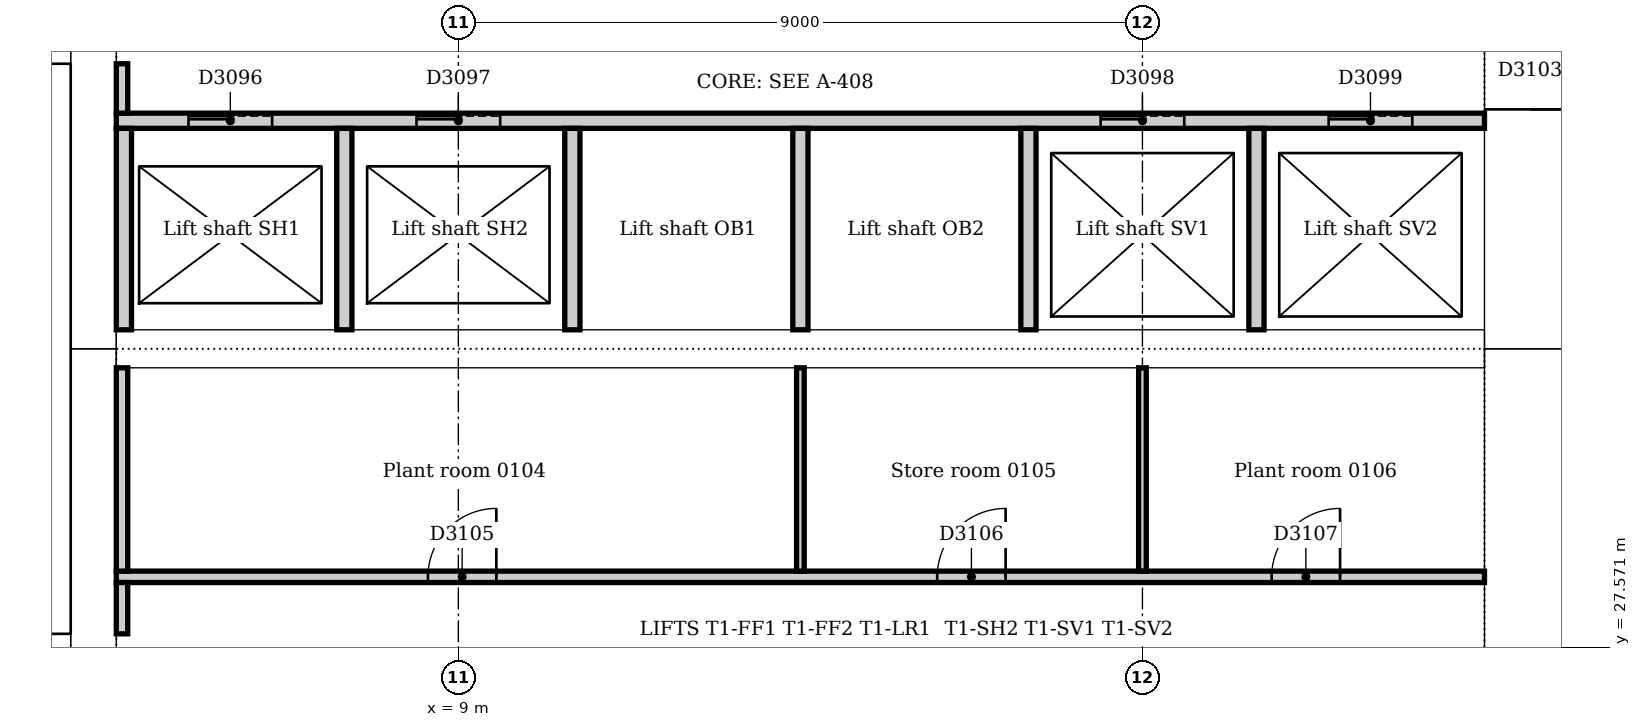
"""IFC4 building model, lengths in metres.
Left out: names, types, materials, properties, quantities, classifications, styles, units other than length and angle.
Written with IfcOpenShell. Run it as: python <this file> out.ifc"""

import sys

from ifc_helpers import new_model, si_unit, direction, frame, frame_2d, origin, place, context, subcontext, project, spatial, rectangle, extrude, element, fill, save


model = new_model("IFC4")
c1 = context("Model", 3, precision=1e-05, world=origin(), true_north=direction((0.0, 1.0)))
c2 = subcontext(c1, "Body", "Model", "MODEL_VIEW")
j1 = project(units=[si_unit("LENGTHUNIT", "METRE"), si_unit("PLANEANGLEUNIT", "RADIAN")], contexts=[c1])
p1 = place(None, origin())
s1 = spatial("IfcSite", under=j1, at=p1, CompositionType="ELEMENT")
p2 = place(p1, origin())
s2 = spatial("IfcBuilding", under=s1, at=p2, CompositionType="ELEMENT")
p3 = place(p2, frame((0.0, 0.0, 6.0)))
s3 = spatial("IfcBuildingStorey", under=s2, at=p3, CompositionType="ELEMENT", Elevation=6.0)
p4 = place(p3, frame((23.1, 21.0, 0.0), z_axis=(0.0, 0.0, 1.0), x_axis=(0.0, 1.0, 0.0)))
e1 = element("IfcWall", 1, at=p4, inside=s3, PredefinedType="SOLIDWALL", context=c2, shape_type="SweptSolid", body=[
    extrude(rectangle(XDim=10.5, YDim=1.2, at=frame_2d((5.25, 0.0))), origin(), (0.0, 0.0, 1.0), 5.0),
])
p5 = place(p4, frame((4.35, 0.0, 0.0)))
e2 = element("IfcOpeningElement", 2, at=p5, cuts=e1, PredefinedType="OPENING", context=c2, shape_type="SweptSolid", body=[
    extrude(rectangle(XDim=1.8, YDim=2.1, at=frame_2d((0.9, 1.05))), frame((0.0, 0.61, 0.0), z_axis=(0.0, -1.0, 0.0), x_axis=(1.0, 0.0, 0.0)), (0.0, 0.0, 1.0), 1.22),
])
p6 = place(p3, frame((23.1, 31.5, 0.0), z_axis=(0.0, 0.0, 1.0), x_axis=(0.0, 1.0, 0.0)))
e3 = element("IfcWall", 3, at=p6, inside=s3, PredefinedType="SOLIDWALL", context=c2, shape_type="SweptSolid", body=[
    extrude(rectangle(XDim=10.5, YDim=1.2, at=frame_2d((5.25, 0.0))), origin(), (0.0, 0.0, 1.0), 5.0),
])
p7 = place(p6, frame((3.15, 0.0, 0.0)))
e4 = element("IfcOpeningElement", 4, at=p7, cuts=e3, PredefinedType="OPENING", context=c2, shape_type="SweptSolid", body=[
    extrude(rectangle(XDim=1.0, YDim=2.1, at=frame_2d((0.5, 1.05))), frame((0.0, 0.61, 0.0), z_axis=(0.0, -1.0, 0.0), x_axis=(1.0, 0.0, 0.0)), (0.0, 0.0, 1.0), 1.22),
])
p8 = place(p6, frame((5.2, 0.0, 0.0)))
e5 = element("IfcOpeningElement", 5, at=p8, cuts=e3, PredefinedType="OPENING", context=c2, shape_type="SweptSolid", body=[
    extrude(rectangle(XDim=1.0, YDim=2.1, at=frame_2d((0.5, 1.05))), frame((0.0, 0.61, 0.0), z_axis=(0.0, -1.0, 0.0), x_axis=(1.0, 0.0, 0.0)), (0.0, 0.0, 1.0), 1.22),
])
p9 = place(p3, frame((4.2, 42.0, 0.0), z_axis=(0.0, 0.0, 1.0), x_axis=(0.0, -1.0, 0.0)))
e6 = element("IfcWall", 6, at=p9, inside=s3, PredefinedType="SOLIDWALL", context=c2, shape_type="SweptSolid", body=[
    extrude(rectangle(XDim=10.5, YDim=0.6, at=frame_2d((5.25, 0.0))), origin(), (0.0, 0.0, 1.0), 5.0),
])
p10 = place(p9, frame((5.3, 0.0, 0.0)))
e7 = element("IfcOpeningElement", 7, at=p10, cuts=e6, PredefinedType="OPENING", context=c2, shape_type="SweptSolid", body=[
    extrude(rectangle(XDim=1.0, YDim=2.1, at=frame_2d((0.5, 1.05))), frame((0.0, 0.31, 0.0), z_axis=(0.0, -1.0, 0.0), x_axis=(1.0, 0.0, 0.0)), (0.0, 0.0, 1.0), 0.62),
])
p11 = place(p3, frame((4.2, 31.5, 0.0), z_axis=(0.0, 0.0, 1.0), x_axis=(0.0, -1.0, 0.0)))
e8 = element("IfcWall", 8, at=p11, inside=s3, PredefinedType="SOLIDWALL", context=c2, shape_type="SweptSolid", body=[
    extrude(rectangle(XDim=10.5, YDim=0.6, at=frame_2d((5.25, 0.0))), origin(), (0.0, 0.0, 1.0), 5.0),
])
p12 = place(p11, frame((4.25, 0.0, 0.0)))
e9 = element("IfcOpeningElement", 9, at=p12, cuts=e8, PredefinedType="OPENING", context=c2, shape_type="SweptSolid", body=[
    extrude(rectangle(XDim=1.0, YDim=2.1, at=frame_2d((0.5, 1.05))), frame((0.0, 0.31, 0.0), z_axis=(0.0, -1.0, 0.0), x_axis=(1.0, 0.0, 0.0)), (0.0, 0.0, 1.0), 0.62),
])
p13 = place(p3, frame((4.5, 31.5, 0.0), z_axis=(0.0, 0.0, 1.0), x_axis=(1.0, 0.0, 0.0)))
e10 = element("IfcWall", 10, at=p13, inside=s3, PredefinedType="SOLIDWALL", context=c2, shape_type="SweptSolid", body=[
    extrude(rectangle(XDim=18.0, YDim=0.5, at=frame_2d((9.0, 0.0))), origin(), (0.0, 0.0, 1.0), 5.0),
])
p14 = place(p3, frame((3.9, 27.625, 0.0), z_axis=(0.0, 0.0, 1.0), x_axis=(-1.0, 0.0, 0.0)))
e11 = element("IfcWall", 11, at=p14, inside=s3, PredefinedType="SOLIDWALL", context=c2, shape_type="SweptSolid", body=[
    extrude(rectangle(XDim=3.54, YDim=0.25, at=frame_2d((1.77, 0.0))), origin(), (0.0, 0.0, 1.0), 5.0),
])
p15 = place(p14, frame((0.4, 0.0, 0.0)))
e12 = element("IfcOpeningElement", 12, at=p15, cuts=e11, PredefinedType="OPENING", context=c2, shape_type="SweptSolid", body=[
    extrude(rectangle(XDim=1.0, YDim=2.1, at=frame_2d((0.5, 1.05))), frame((0.0, 0.135, 0.0), z_axis=(0.0, -1.0, 0.0), x_axis=(1.0, 0.0, 0.0)), (0.0, 0.0, 1.0), 0.27),
])
p16 = place(p3, frame((0.36, 35.375, 0.0), z_axis=(0.0, 0.0, 1.0), x_axis=(1.0, 0.0, 0.0)))
e13 = element("IfcWall", 13, at=p16, inside=s3, PredefinedType="SOLIDWALL", context=c2, shape_type="SweptSolid", body=[
    extrude(rectangle(XDim=3.54, YDim=0.25, at=frame_2d((1.77, 0.0))), origin(), (0.0, 0.0, 1.0), 5.0),
])
p17 = place(p16, frame((2.14, 0.0, 0.0)))
e14 = element("IfcOpeningElement", 14, at=p17, cuts=e13, PredefinedType="OPENING", context=c2, shape_type="SweptSolid", body=[
    extrude(rectangle(XDim=1.0, YDim=2.1, at=frame_2d((0.5, 1.05))), frame((0.0, 0.135, 0.0), z_axis=(0.0, -1.0, 0.0), x_axis=(1.0, 0.0, 0.0)), (0.0, 0.0, 1.0), 0.27),
])
p18 = place(p3, frame((4.5, 34.5, 0.0), z_axis=(0.0, 0.0, 1.0), x_axis=(1.0, 0.0, 0.0)))
e15 = element("IfcWall", 15, at=p18, inside=s3, PredefinedType="PARTITIONING", context=c2, shape_type="SweptSolid", body=[
    extrude(rectangle(XDim=18.0, YDim=0.2, at=frame_2d((9.0, 0.0))), origin(), (0.0, 0.0, 1.0), 4.7),
])
p19 = place(p18, frame((0.95, 0.0, 0.0)))
e16 = element("IfcOpeningElement", 16, at=p19, cuts=e15, PredefinedType="OPENING", context=c2, shape_type="SweptSolid", body=[
    extrude(rectangle(XDim=1.1, YDim=2.1, at=frame_2d((0.55, 1.05))), frame((0.0, 0.11, 0.0), z_axis=(0.0, -1.0, 0.0), x_axis=(1.0, 0.0, 0.0)), (0.0, 0.0, 1.0), 0.22),
])
p20 = place(p18, frame((3.95, 0.0, 0.0)))
e17 = element("IfcOpeningElement", 17, at=p20, cuts=e15, PredefinedType="OPENING", context=c2, shape_type="SweptSolid", body=[
    extrude(rectangle(XDim=1.1, YDim=2.1, at=frame_2d((0.55, 1.05))), frame((0.0, 0.11, 0.0), z_axis=(0.0, -1.0, 0.0), x_axis=(1.0, 0.0, 0.0)), (0.0, 0.0, 1.0), 0.22),
])
p21 = place(p18, frame((12.95, 0.0, 0.0)))
e18 = element("IfcOpeningElement", 18, at=p21, cuts=e15, PredefinedType="OPENING", context=c2, shape_type="SweptSolid", body=[
    extrude(rectangle(XDim=1.1, YDim=2.1, at=frame_2d((0.55, 1.05))), frame((0.0, 0.11, 0.0), z_axis=(0.0, -1.0, 0.0), x_axis=(1.0, 0.0, 0.0)), (0.0, 0.0, 1.0), 0.22),
])
p22 = place(p18, frame((15.95, 0.0, 0.0)))
e19 = element("IfcOpeningElement", 19, at=p22, cuts=e15, PredefinedType="OPENING", context=c2, shape_type="SweptSolid", body=[
    extrude(rectangle(XDim=1.1, YDim=2.1, at=frame_2d((0.55, 1.05))), frame((0.0, 0.11, 0.0), z_axis=(0.0, -1.0, 0.0), x_axis=(1.0, 0.0, 0.0)), (0.0, 0.0, 1.0), 0.22),
])
for number, where, z_axis, x_axis in (
    (20, (4.6, 31.75, 0.0), (0.0, 0.0, 1.0), (0.0, 1.0, 0.0)),
    (21, (7.5, 31.75, 0.0), (0.0, 0.0, 1.0), (0.0, 1.0, 0.0)),
    (22, (10.5, 31.75, 0.0), (0.0, 0.0, 1.0), (0.0, 1.0, 0.0)),
    (23, (13.5, 31.75, 0.0), (0.0, 0.0, 1.0), (0.0, 1.0, 0.0)),
    (24, (16.5, 31.75, 0.0), (0.0, 0.0, 1.0), (0.0, 1.0, 0.0)),
    (25, (19.5, 31.75, 0.0), (0.0, 0.0, 1.0), (0.0, 1.0, 0.0)),
):
    element("IfcWall", number, at=place(p3, frame(where, z_axis=z_axis, x_axis=x_axis)), inside=s3, PredefinedType="PARTITIONING", context=c2, shape_type="SweptSolid", body=[
        extrude(rectangle(XDim=2.65, YDim=0.2, at=frame_2d((1.325, 0.0))), origin(), (0.0, 0.0, 1.0), 4.7),
    ])
p23 = place(p3, frame((4.5, 28.5, 0.0), z_axis=(0.0, 0.0, 1.0), x_axis=(1.0, 0.0, 0.0)))
e26 = element("IfcWall", 26, at=p23, inside=s3, PredefinedType="PARTITIONING", context=c2, shape_type="SweptSolid", body=[
    extrude(rectangle(XDim=18.0, YDim=0.15, at=frame_2d((9.0, 0.0))), origin(), (0.0, 0.0, 1.0), 4.7),
])
p24 = place(p23, frame((4.1, 0.0, 0.0)))
e27 = element("IfcOpeningElement", 27, at=p24, cuts=e26, PredefinedType="OPENING", context=c2, shape_type="SweptSolid", body=[
    extrude(rectangle(XDim=0.9, YDim=2.1, at=frame_2d((0.45, 1.05))), frame((0.0, 0.085, 0.0), z_axis=(0.0, -1.0, 0.0), x_axis=(1.0, 0.0, 0.0)), (0.0, 0.0, 1.0), 0.17),
])
p25 = place(p23, frame((10.8, 0.0, 0.0)))
e28 = element("IfcOpeningElement", 28, at=p25, cuts=e26, PredefinedType="OPENING", context=c2, shape_type="SweptSolid", body=[
    extrude(rectangle(XDim=0.9, YDim=2.1, at=frame_2d((0.45, 1.05))), frame((0.0, 0.085, 0.0), z_axis=(0.0, -1.0, 0.0), x_axis=(1.0, 0.0, 0.0)), (0.0, 0.0, 1.0), 0.17),
])
p26 = place(p23, frame((15.2, 0.0, 0.0)))
e29 = element("IfcOpeningElement", 29, at=p26, cuts=e26, PredefinedType="OPENING", context=c2, shape_type="SweptSolid", body=[
    extrude(rectangle(XDim=0.9, YDim=2.1, at=frame_2d((0.45, 1.05))), frame((0.0, 0.085, 0.0), z_axis=(0.0, -1.0, 0.0), x_axis=(1.0, 0.0, 0.0)), (0.0, 0.0, 1.0), 0.17),
])
p27 = place(p3, frame((4.575, 27.75, 0.0), z_axis=(0.0, 0.0, 1.0), x_axis=(0.0, 1.0, 0.0)))
e30 = element("IfcWall", 30, at=p27, inside=s3, PredefinedType="PARTITIONING", context=c2, shape_type="SweptSolid", body=[
    extrude(rectangle(XDim=0.675, YDim=0.15, at=frame_2d((0.338, 0.0))), origin(), (0.0, 0.0, 1.0), 4.7),
])
p28 = place(p3, frame((4.575, 28.575, 0.0), z_axis=(0.0, 0.0, 1.0), x_axis=(0.0, 1.0, 0.0)))
e31 = element("IfcWall", 31, at=p28, inside=s3, PredefinedType="PARTITIONING", context=c2, shape_type="SweptSolid", body=[
    extrude(rectangle(XDim=2.675, YDim=0.15, at=frame_2d((1.337, 0.0))), origin(), (0.0, 0.0, 1.0), 4.7),
])
p29 = place(p3, frame((4.575, 34.6, 0.0), z_axis=(0.0, 0.0, 1.0), x_axis=(0.0, 1.0, 0.0)))
e32 = element("IfcWall", 32, at=p29, inside=s3, PredefinedType="PARTITIONING", context=c2, shape_type="SweptSolid", body=[
    extrude(rectangle(XDim=0.65, YDim=0.15, at=frame_2d((0.325, 0.0))), origin(), (0.0, 0.0, 1.0), 4.7),
])
for number, where, z_axis, x_axis in (
    (33, (13.5, 28.575, 0.0), (0.0, 0.0, 1.0), (0.0, 1.0, 0.0)),
    (34, (18.0, 28.575, 0.0), (0.0, 0.0, 1.0), (0.0, 1.0, 0.0)),
):
    element("IfcWall", number, at=place(p3, frame(where, z_axis=z_axis, x_axis=x_axis)), inside=s3, PredefinedType="PARTITIONING", context=c2, shape_type="SweptSolid", body=[
        extrude(rectangle(XDim=2.675, YDim=0.1, at=frame_2d((1.337, 0.0))), origin(), (0.0, 0.0, 1.0), 4.7),
    ])
p30 = place(p19, origin())
e35 = element("IfcDoor", 35, at=p30, inside=s3, OperationType="SLIDING_TO_LEFT", PredefinedType="DOOR", context=c2, shape_type="SweptSolid", body=[
    extrude(rectangle(XDim=1.1, YDim=2.1, at=frame_2d((0.55, 1.05))), frame((0.0, 0.025, 0.0), z_axis=(0.0, -1.0, 0.0), x_axis=(1.0, 0.0, 0.0)), (0.0, 0.0, 1.0), 0.05),
])
fill(e16, e35)
p31 = place(p20, origin())
e36 = element("IfcDoor", 36, at=p31, inside=s3, OperationType="SLIDING_TO_LEFT", PredefinedType="DOOR", context=c2, shape_type="SweptSolid", body=[
    extrude(rectangle(XDim=1.1, YDim=2.1, at=frame_2d((0.55, 1.05))), frame((0.0, 0.025, 0.0), z_axis=(0.0, -1.0, 0.0), x_axis=(1.0, 0.0, 0.0)), (0.0, 0.0, 1.0), 0.05),
])
fill(e17, e36)
p32 = place(p21, origin())
e37 = element("IfcDoor", 37, at=p32, inside=s3, OperationType="SLIDING_TO_LEFT", PredefinedType="DOOR", context=c2, shape_type="SweptSolid", body=[
    extrude(rectangle(XDim=1.1, YDim=2.1, at=frame_2d((0.55, 1.05))), frame((0.0, 0.025, 0.0), z_axis=(0.0, -1.0, 0.0), x_axis=(1.0, 0.0, 0.0)), (0.0, 0.0, 1.0), 0.05),
])
fill(e18, e37)
p33 = place(p22, origin())
e38 = element("IfcDoor", 38, at=p33, inside=s3, OperationType="SLIDING_TO_LEFT", PredefinedType="DOOR", context=c2, shape_type="SweptSolid", body=[
    extrude(rectangle(XDim=1.1, YDim=2.1, at=frame_2d((0.55, 1.05))), frame((0.0, 0.025, 0.0), z_axis=(0.0, -1.0, 0.0), x_axis=(1.0, 0.0, 0.0)), (0.0, 0.0, 1.0), 0.05),
])
fill(e19, e38)
p34 = place(p7, frame((1.0, 0.0, 0.0), z_axis=(0.0, 0.0, 1.0), x_axis=(-1.0, 0.0, 0.0)))
e39 = element("IfcDoor", 39, at=p34, inside=s3, OperationType="SINGLE_SWING_RIGHT", PredefinedType="DOOR", context=c2, shape_type="SweptSolid", body=[
    extrude(rectangle(XDim=1.0, YDim=2.1, at=frame_2d((0.5, 1.05))), frame((0.0, 0.025, 0.0), z_axis=(0.0, -1.0, 0.0), x_axis=(1.0, 0.0, 0.0)), (0.0, 0.0, 1.0), 0.05),
])
fill(e4, e39)
p35 = place(p24, origin())
e40 = element("IfcDoor", 40, at=p35, inside=s3, OperationType="SINGLE_SWING_RIGHT", PredefinedType="DOOR", context=c2, shape_type="SweptSolid", body=[
    extrude(rectangle(XDim=0.9, YDim=2.1, at=frame_2d((0.45, 1.05))), frame((0.0, 0.025, 0.0), z_axis=(0.0, -1.0, 0.0), x_axis=(1.0, 0.0, 0.0)), (0.0, 0.0, 1.0), 0.05),
])
fill(e27, e40)
p36 = place(p25, origin())
e41 = element("IfcDoor", 41, at=p36, inside=s3, OperationType="SINGLE_SWING_RIGHT", PredefinedType="DOOR", context=c2, shape_type="SweptSolid", body=[
    extrude(rectangle(XDim=0.9, YDim=2.1, at=frame_2d((0.45, 1.05))), frame((0.0, 0.025, 0.0), z_axis=(0.0, -1.0, 0.0), x_axis=(1.0, 0.0, 0.0)), (0.0, 0.0, 1.0), 0.05),
])
fill(e28, e41)
p37 = place(p26, origin())
e42 = element("IfcDoor", 42, at=p37, inside=s3, OperationType="SINGLE_SWING_RIGHT", PredefinedType="DOOR", context=c2, shape_type="SweptSolid", body=[
    extrude(rectangle(XDim=0.9, YDim=2.1, at=frame_2d((0.45, 1.05))), frame((0.0, 0.025, 0.0), z_axis=(0.0, -1.0, 0.0), x_axis=(1.0, 0.0, 0.0)), (0.0, 0.0, 1.0), 0.05),
])
fill(e29, e42)
save(model, sys.argv[1])
